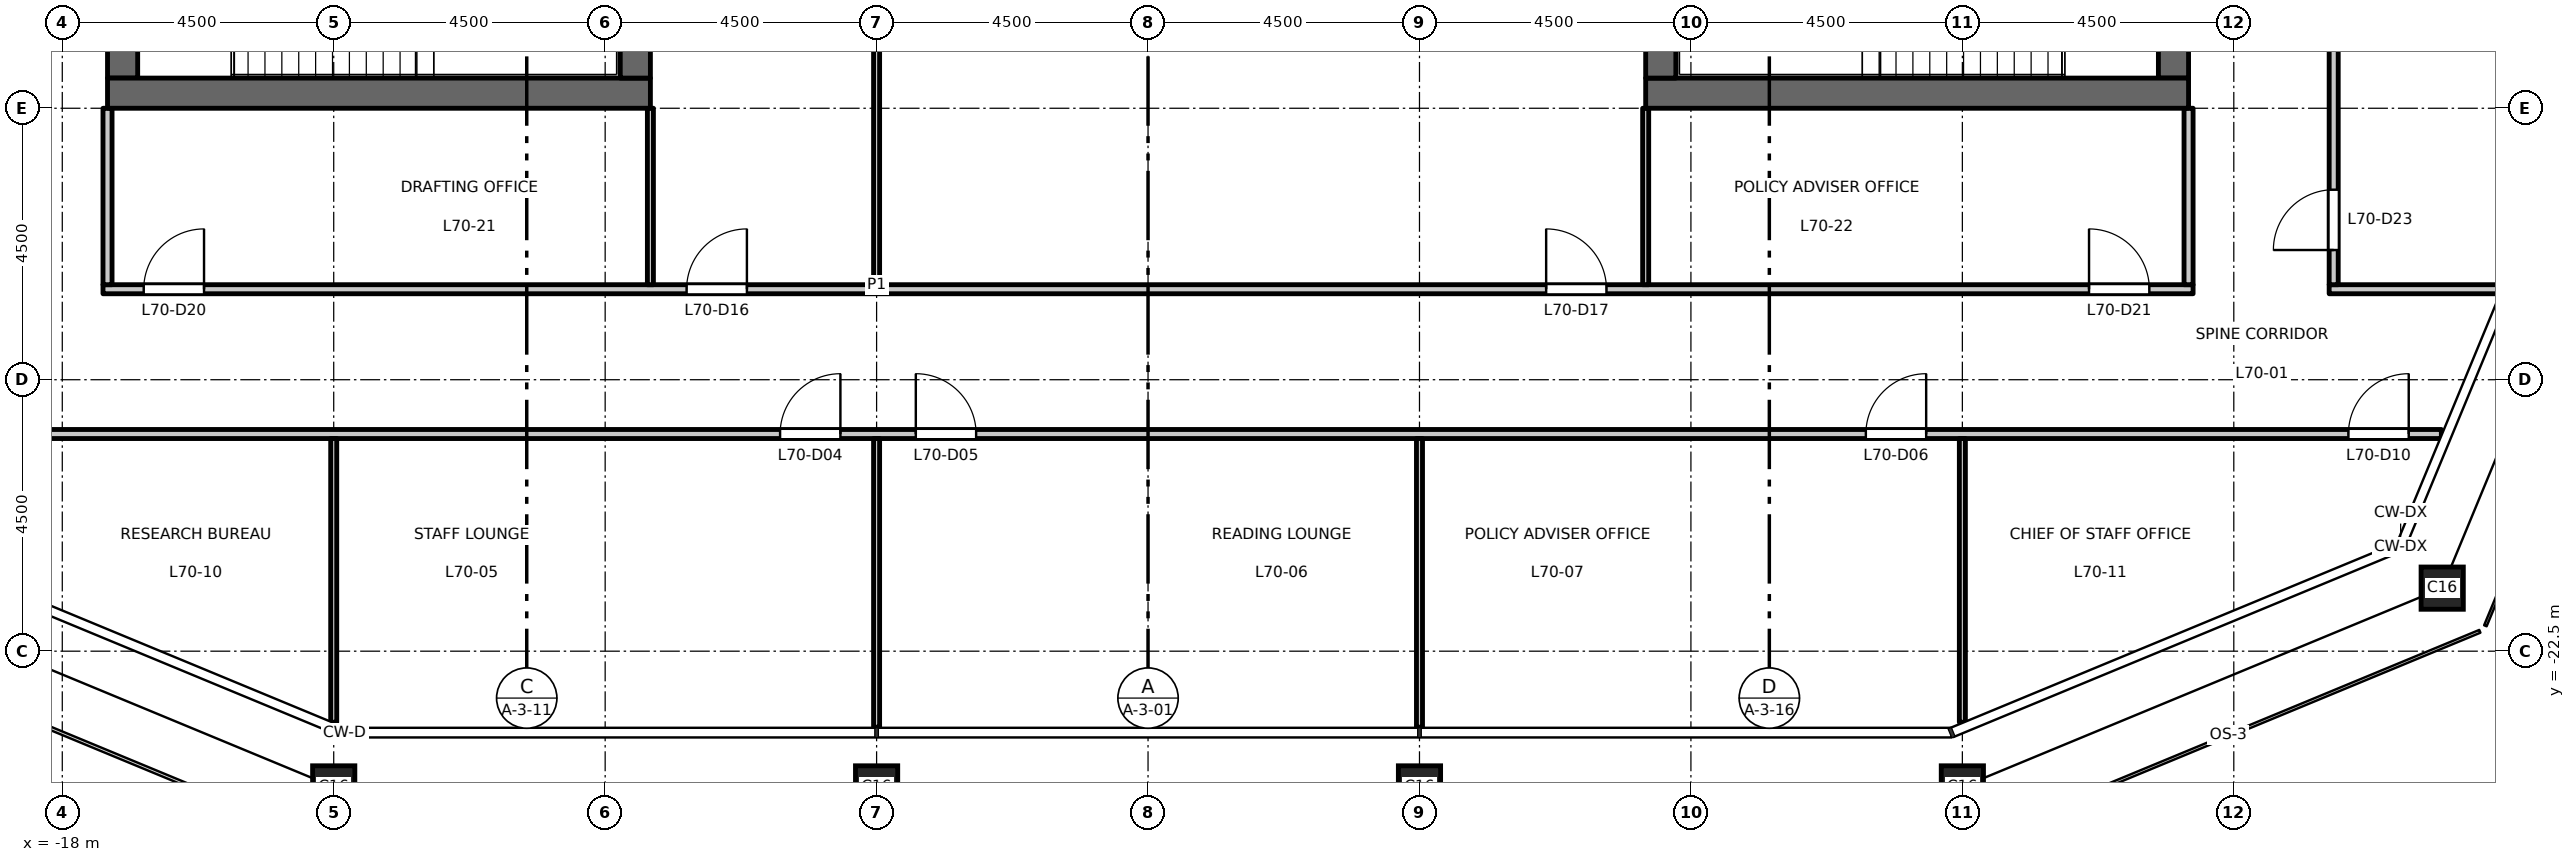
"""IFC4 building model, lengths in metres.
Left out: names, types, materials, properties, quantities, classifications, styles, units other than length and angle.
Written with IfcOpenShell. Run it as: python <this file> out.ifc"""

import sys

from ifc_helpers import new_model, si_unit, direction, frame, frame_2d, origin, origin_2d, place, context, subcontext, project, spatial, rectangle, hollow_rectangle, extrude, element, fill, save


model = new_model("IFC4")
c1 = context("Model", 3, precision=1e-05, world=origin(), true_north=direction((0.0, 1.0)))
c2 = subcontext(c1, "Body", "Model", "MODEL_VIEW")
j1 = project(units=[si_unit("LENGTHUNIT", "METRE"), si_unit("PLANEANGLEUNIT", "RADIAN")], contexts=[c1])
p1 = place(None, origin())
s1 = spatial("IfcSite", under=j1, at=p1, CompositionType="ELEMENT")
p2 = place(p1, origin())
s2 = spatial("IfcBuilding", under=s1, at=p2, CompositionType="ELEMENT")
p3 = place(p2, frame((0.0, 0.0, 325.7)))
s3 = spatial("IfcBuildingStorey", under=s2, at=p3, CompositionType="ELEMENT", Elevation=325.7)
for number, where, z_axis, x_axis in (
    (1, (-13.5, -24.75, 0.0), (0.0, 0.0, 1.0), (1.0, 0.0, 0.0)),
    (2, (-4.5, -24.75, 0.0), (0.0, 0.0, 1.0), (1.0, 0.0, 0.0)),
    (3, (4.5, -24.75, 0.0), (0.0, 0.0, 1.0), (1.0, 0.0, 0.0)),
    (4, (13.5, -24.75, 0.0), (0.0, 0.0, 1.0), (1.0, 0.0, 0.0)),
    (5, (21.455, -21.455, 0.0), (0.0, 0.0, 1.0), (1.0, 0.0, 0.0)),
):
    element("IfcColumn", number, at=place(p3, frame(where, z_axis=z_axis, x_axis=x_axis)), inside=s3, PredefinedType="COLUMN", context=c2, shape_type="SweptSolid", body=[
        extrude(hollow_rectangle(XDim=0.7, YDim=0.7, WallThickness=0.036, at=origin_2d()), origin(), (0.0, 0.0, 1.0), 4.5),
    ])
p4 = place(p3, frame((-17.0, -13.0, 0.0), z_axis=(0.0, 0.0, 1.0), x_axis=(0.0, 1.0, 0.0)))
e6 = element("IfcWall", 6, at=p4, inside=s3, PredefinedType="SHEAR", context=c2, shape_type="SweptSolid", body=[
    extrude(rectangle(XDim=26.0, YDim=0.5, at=frame_2d((13.0, 0.0))), origin(), (0.0, 0.0, 1.0), 4.35),
])
p5 = place(p4, frame((16.825, 0.0, 0.0)))
e7 = element("IfcOpeningElement", 7, at=p5, cuts=e6, PredefinedType="OPENING", context=c2, shape_type="SweptSolid", body=[
    extrude(rectangle(XDim=1.8, YDim=2.1, at=frame_2d((0.9, 1.05))), frame((0.0, 0.26, 0.0), z_axis=(0.0, -1.0, 0.0), x_axis=(1.0, 0.0, 0.0)), (0.0, 0.0, 1.0), 0.52),
])
p6 = place(p4, frame((7.375, 0.0, 0.0)))
e8 = element("IfcOpeningElement", 8, at=p6, cuts=e6, PredefinedType="OPENING", context=c2, shape_type="SweptSolid", body=[
    extrude(rectangle(XDim=1.8, YDim=2.1, at=frame_2d((0.9, 1.05))), frame((0.0, 0.26, 0.0), z_axis=(0.0, -1.0, 0.0), x_axis=(1.0, 0.0, 0.0)), (0.0, 0.0, 1.0), 0.52),
])
p7 = place(p3, frame((-8.25, -13.25, 0.0), z_axis=(0.0, 0.0, 1.0), x_axis=(-1.0, 0.0, 0.0)))
e9 = element("IfcWall", 9, at=p7, inside=s3, PredefinedType="SHEAR", context=c2, shape_type="SweptSolid", body=[
    extrude(rectangle(XDim=9.0, YDim=0.5, at=frame_2d((4.5, 0.0))), origin(), (0.0, 0.0, 1.0), 4.35),
])
p8 = place(p3, frame((-8.5, -13.0, 0.0), z_axis=(0.0, 0.0, 1.0), x_axis=(0.0, 1.0, 0.0)))
e10 = element("IfcWall", 10, at=p8, inside=s3, PredefinedType="SHEAR", context=c2, shape_type="SweptSolid", body=[
    extrude(rectangle(XDim=26.0, YDim=0.5, at=frame_2d((13.0, 0.0))), origin(), (0.0, 0.0, 1.0), 4.35),
])
p9 = place(p3, frame((17.0, -13.0, 0.0), z_axis=(0.0, 0.0, 1.0), x_axis=(0.0, 1.0, 0.0)))
e11 = element("IfcWall", 11, at=p9, inside=s3, PredefinedType="SHEAR", context=c2, shape_type="SweptSolid", body=[
    extrude(rectangle(XDim=26.0, YDim=0.5, at=frame_2d((13.0, 0.0))), origin(), (0.0, 0.0, 1.0), 4.35),
])
p10 = place(p9, frame((16.825, 0.0, 0.0)))
e12 = element("IfcOpeningElement", 12, at=p10, cuts=e11, PredefinedType="OPENING", context=c2, shape_type="SweptSolid", body=[
    extrude(rectangle(XDim=1.8, YDim=2.1, at=frame_2d((0.9, 1.05))), frame((0.0, 0.26, 0.0), z_axis=(0.0, -1.0, 0.0), x_axis=(1.0, 0.0, 0.0)), (0.0, 0.0, 1.0), 0.52),
])
p11 = place(p9, frame((7.375, 0.0, 0.0)))
e13 = element("IfcOpeningElement", 13, at=p11, cuts=e11, PredefinedType="OPENING", context=c2, shape_type="SweptSolid", body=[
    extrude(rectangle(XDim=1.8, YDim=2.1, at=frame_2d((0.9, 1.05))), frame((0.0, 0.26, 0.0), z_axis=(0.0, -1.0, 0.0), x_axis=(1.0, 0.0, 0.0)), (0.0, 0.0, 1.0), 0.52),
])
p12 = place(p3, frame((8.25, -13.25, 0.0), z_axis=(0.0, 0.0, 1.0), x_axis=(1.0, 0.0, 0.0)))
e14 = element("IfcWall", 14, at=p12, inside=s3, PredefinedType="SHEAR", context=c2, shape_type="SweptSolid", body=[
    extrude(rectangle(XDim=9.0, YDim=0.5, at=frame_2d((4.5, 0.0))), origin(), (0.0, 0.0, 1.0), 4.35),
])
p13 = place(p3, frame((8.5, -13.0, 0.0), z_axis=(0.0, 0.0, 1.0), x_axis=(0.0, 1.0, 0.0)))
e15 = element("IfcWall", 15, at=p13, inside=s3, PredefinedType="SHEAR", context=c2, shape_type="SweptSolid", body=[
    extrude(rectangle(XDim=26.0, YDim=0.5, at=frame_2d((13.0, 0.0))), origin(), (0.0, 0.0, 1.0), 4.35),
])
p14 = place(p3, frame((-21.441, -18.9, 0.0), z_axis=(0.0, 0.0, 1.0), x_axis=(1.0, 0.0, 0.0)))
e16 = element("IfcWall", 16, at=p14, inside=s3, PredefinedType="PARTITIONING", context=c2, shape_type="SweptSolid", body=[
    extrude(rectangle(XDim=42.882, YDim=0.15, at=frame_2d((21.441, 0.0))), origin(), (0.0, 0.0, 1.0), 4.35),
])
p15 = place(p14, frame((15.341, 0.0, 0.0)))
e17 = element("IfcOpeningElement", 17, at=p15, cuts=e16, PredefinedType="OPENING", context=c2, shape_type="SweptSolid", body=[
    extrude(rectangle(XDim=1.0, YDim=2.1, at=frame_2d((0.5, 1.05))), frame((0.0, 0.085, 0.0), z_axis=(0.0, -1.0, 0.0), x_axis=(1.0, 0.0, 0.0)), (0.0, 0.0, 1.0), 0.17),
])
p16 = place(p14, frame((17.591, 0.0, 0.0)))
e18 = element("IfcOpeningElement", 18, at=p16, cuts=e16, PredefinedType="OPENING", context=c2, shape_type="SweptSolid", body=[
    extrude(rectangle(XDim=1.0, YDim=2.1, at=frame_2d((0.5, 1.05))), frame((0.0, 0.085, 0.0), z_axis=(0.0, -1.0, 0.0), x_axis=(1.0, 0.0, 0.0)), (0.0, 0.0, 1.0), 0.17),
])
p17 = place(p14, frame((33.341, 0.0, 0.0)))
e19 = element("IfcOpeningElement", 19, at=p17, cuts=e16, PredefinedType="OPENING", context=c2, shape_type="SweptSolid", body=[
    extrude(rectangle(XDim=1.0, YDim=2.1, at=frame_2d((0.5, 1.05))), frame((0.0, 0.085, 0.0), z_axis=(0.0, -1.0, 0.0), x_axis=(1.0, 0.0, 0.0)), (0.0, 0.0, 1.0), 0.17),
])
p18 = place(p14, frame((0.65, 0.0, 0.0)))
e20 = element("IfcOpeningElement", 20, at=p18, cuts=e16, PredefinedType="OPENING", context=c2, shape_type="SweptSolid", body=[
    extrude(rectangle(XDim=1.0, YDim=2.1, at=frame_2d((0.5, 1.05))), frame((0.0, 0.085, 0.0), z_axis=(0.0, -1.0, 0.0), x_axis=(1.0, 0.0, 0.0)), (0.0, 0.0, 1.0), 0.17),
])
p19 = place(p14, frame((41.341, 0.0, 0.0)))
e21 = element("IfcOpeningElement", 21, at=p19, cuts=e16, PredefinedType="OPENING", context=c2, shape_type="SweptSolid", body=[
    extrude(rectangle(XDim=1.0, YDim=2.1, at=frame_2d((0.5, 1.05))), frame((0.0, 0.085, 0.0), z_axis=(0.0, -1.0, 0.0), x_axis=(1.0, 0.0, 0.0)), (0.0, 0.0, 1.0), 0.17),
])
p20 = place(p3, frame((-17.325, -16.5, 0.0), z_axis=(0.0, 0.0, 1.0), x_axis=(1.0, 0.0, 0.0)))
e22 = element("IfcWall", 22, at=p20, inside=s3, PredefinedType="PARTITIONING", context=c2, shape_type="SweptSolid", body=[
    extrude(rectangle(XDim=34.65, YDim=0.15, at=frame_2d((17.325, 0.0))), origin(), (0.0, 0.0, 1.0), 4.35),
])
p21 = place(p20, frame((9.675, 0.0, 0.0)))
e23 = element("IfcOpeningElement", 23, at=p21, cuts=e22, PredefinedType="OPENING", context=c2, shape_type="SweptSolid", body=[
    extrude(rectangle(XDim=1.0, YDim=2.1, at=frame_2d((0.5, 1.05))), frame((0.0, 0.085, 0.0), z_axis=(0.0, -1.0, 0.0), x_axis=(1.0, 0.0, 0.0)), (0.0, 0.0, 1.0), 0.17),
])
p22 = place(p20, frame((23.925, 0.0, 0.0)))
e24 = element("IfcOpeningElement", 24, at=p22, cuts=e22, PredefinedType="OPENING", context=c2, shape_type="SweptSolid", body=[
    extrude(rectangle(XDim=1.0, YDim=2.1, at=frame_2d((0.5, 1.05))), frame((0.0, 0.085, 0.0), z_axis=(0.0, -1.0, 0.0), x_axis=(1.0, 0.0, 0.0)), (0.0, 0.0, 1.0), 0.17),
])
p23 = place(p20, frame((0.675, 0.0, 0.0)))
e25 = element("IfcOpeningElement", 25, at=p23, cuts=e22, PredefinedType="OPENING", context=c2, shape_type="SweptSolid", body=[
    extrude(rectangle(XDim=1.0, YDim=2.1, at=frame_2d((0.5, 1.05))), frame((0.0, 0.085, 0.0), z_axis=(0.0, -1.0, 0.0), x_axis=(1.0, 0.0, 0.0)), (0.0, 0.0, 1.0), 0.17),
])
p24 = place(p20, frame((32.925, 0.0, 0.0)))
e26 = element("IfcOpeningElement", 26, at=p24, cuts=e22, PredefinedType="OPENING", context=c2, shape_type="SweptSolid", body=[
    extrude(rectangle(XDim=1.0, YDim=2.1, at=frame_2d((0.5, 1.05))), frame((0.0, 0.085, 0.0), z_axis=(0.0, -1.0, 0.0), x_axis=(1.0, 0.0, 0.0)), (0.0, 0.0, 1.0), 0.17),
])
p25 = place(p3, frame((19.581, -16.5, 0.0), z_axis=(0.0, 0.0, 1.0), x_axis=(1.0, 0.0, 0.0)))
e27 = element("IfcWall", 27, at=p25, inside=s3, PredefinedType="PARTITIONING", context=c2, shape_type="SweptSolid", body=[
    extrude(rectangle(XDim=2.855, YDim=0.15, at=frame_2d((1.427, 0.0))), origin(), (0.0, 0.0, 1.0), 4.35),
])
p26 = place(p3, frame((-17.25, -16.425, 0.0), z_axis=(0.0, 0.0, 1.0), x_axis=(0.0, 1.0, 0.0)))
e28 = element("IfcWall", 28, at=p26, inside=s3, PredefinedType="PARTITIONING", context=c2, shape_type="SweptSolid", body=[
    extrude(rectangle(XDim=2.925, YDim=0.15, at=frame_2d((1.462, 0.0))), origin(), (0.0, 0.0, 1.0), 4.35),
])
p27 = place(p3, frame((-13.5, -23.678, 0.0), z_axis=(0.0, 0.0, 1.0), x_axis=(0.0, 1.0, 0.0)))
e29 = element("IfcWall", 29, at=p27, inside=s3, PredefinedType="PARTITIONING", context=c2, shape_type="SweptSolid", body=[
    extrude(rectangle(XDim=4.703, YDim=0.1, at=frame_2d((2.352, 0.0))), origin(), (0.0, 0.0, 1.0), 3.75),
])
p28 = place(p3, frame((-8.25, -16.425, 0.0), z_axis=(0.0, 0.0, 1.0), x_axis=(0.0, 1.0, 0.0)))
e30 = element("IfcWall", 30, at=p28, inside=s3, PredefinedType="PARTITIONING", context=c2, shape_type="SweptSolid", body=[
    extrude(rectangle(XDim=2.925, YDim=0.1, at=frame_2d((1.462, 0.0))), origin(), (0.0, 0.0, 1.0), 4.35),
])
p29 = place(p3, frame((-4.5, -23.76, 0.0), z_axis=(0.0, 0.0, 1.0), x_axis=(0.0, 1.0, 0.0)))
e31 = element("IfcWall", 31, at=p29, inside=s3, PredefinedType="PARTITIONING", context=c2, shape_type="SweptSolid", body=[
    extrude(rectangle(XDim=4.785, YDim=0.1, at=frame_2d((2.393, 0.0))), origin(), (0.0, 0.0, 1.0), 3.65),
])
p30 = place(p3, frame((-4.5, -16.425, 0.0), z_axis=(0.0, 0.0, 1.0), x_axis=(0.0, 1.0, 0.0)))
e32 = element("IfcWall", 32, at=p30, inside=s3, PredefinedType="PARTITIONING", context=c2, shape_type="SweptSolid", body=[
    extrude(rectangle(XDim=8.055, YDim=0.1, at=frame_2d((4.027, 0.0))), origin(), (0.0, 0.0, 1.0), 3.65),
])
p31 = place(p3, frame((4.5, -23.76, 0.0), z_axis=(0.0, 0.0, 1.0), x_axis=(0.0, 1.0, 0.0)))
e33 = element("IfcWall", 33, at=p31, inside=s3, PredefinedType="PARTITIONING", context=c2, shape_type="SweptSolid", body=[
    extrude(rectangle(XDim=4.785, YDim=0.1, at=frame_2d((2.393, 0.0))), origin(), (0.0, 0.0, 1.0), 3.65),
])
p32 = place(p3, frame((8.25, -16.425, 0.0), z_axis=(0.0, 0.0, 1.0), x_axis=(0.0, 1.0, 0.0)))
e34 = element("IfcWall", 34, at=p32, inside=s3, PredefinedType="PARTITIONING", context=c2, shape_type="SweptSolid", body=[
    extrude(rectangle(XDim=2.925, YDim=0.1, at=frame_2d((1.462, 0.0))), origin(), (0.0, 0.0, 1.0), 4.35),
])
p33 = place(p3, frame((13.5, -23.678, 0.0), z_axis=(0.0, 0.0, 1.0), x_axis=(0.0, 1.0, 0.0)))
e35 = element("IfcWall", 35, at=p33, inside=s3, PredefinedType="PARTITIONING", context=c2, shape_type="SweptSolid", body=[
    extrude(rectangle(XDim=4.703, YDim=0.1, at=frame_2d((2.352, 0.0))), origin(), (0.0, 0.0, 1.0), 3.75),
])
p34 = place(p3, frame((17.25, -16.425, 0.0), z_axis=(0.0, 0.0, 1.0), x_axis=(0.0, 1.0, 0.0)))
e36 = element("IfcWall", 36, at=p34, inside=s3, PredefinedType="PARTITIONING", context=c2, shape_type="SweptSolid", body=[
    extrude(rectangle(XDim=2.925, YDim=0.15, at=frame_2d((1.462, 0.0))), origin(), (0.0, 0.0, 1.0), 4.35),
])
p35 = place(p3, frame((19.656, -16.425, 0.0), z_axis=(0.0, 0.0, 1.0), x_axis=(0.0, 1.0, 0.0)))
e37 = element("IfcWall", 37, at=p35, inside=s3, PredefinedType="PARTITIONING", context=c2, shape_type="SweptSolid", body=[
    extrude(rectangle(XDim=32.845, YDim=0.15, at=frame_2d((16.422, 0.0))), origin(), (0.0, 0.0, 1.0), 4.35),
])
p36 = place(p35, frame((0.575, 0.0, 0.0)))
e38 = element("IfcOpeningElement", 38, at=p36, cuts=e37, PredefinedType="OPENING", context=c2, shape_type="SweptSolid", body=[
    extrude(rectangle(XDim=1.0, YDim=2.1, at=frame_2d((0.5, 1.05))), frame((0.0, 0.085, 0.0), z_axis=(0.0, -1.0, 0.0), x_axis=(1.0, 0.0, 0.0)), (0.0, 0.0, 1.0), 0.17),
])
p37 = place(p15, origin())
e39 = element("IfcDoor", 39, at=p37, inside=s3, OperationType="SINGLE_SWING_RIGHT", PredefinedType="DOOR", context=c2, shape_type="SweptSolid", body=[
    extrude(rectangle(XDim=1.0, YDim=2.1, at=frame_2d((0.5, 1.05))), frame((0.0, 0.025, 0.0), z_axis=(0.0, -1.0, 0.0), x_axis=(1.0, 0.0, 0.0)), (0.0, 0.0, 1.0), 0.05),
])
fill(e17, e39)
p38 = place(p16, origin())
e40 = element("IfcDoor", 40, at=p38, inside=s3, OperationType="SINGLE_SWING_LEFT", PredefinedType="DOOR", context=c2, shape_type="SweptSolid", body=[
    extrude(rectangle(XDim=1.0, YDim=2.1, at=frame_2d((0.5, 1.05))), frame((0.0, 0.025, 0.0), z_axis=(0.0, -1.0, 0.0), x_axis=(1.0, 0.0, 0.0)), (0.0, 0.0, 1.0), 0.05),
])
fill(e18, e40)
p39 = place(p17, origin())
e41 = element("IfcDoor", 41, at=p39, inside=s3, OperationType="SINGLE_SWING_RIGHT", PredefinedType="DOOR", context=c2, shape_type="SweptSolid", body=[
    extrude(rectangle(XDim=1.0, YDim=2.1, at=frame_2d((0.5, 1.05))), frame((0.0, 0.025, 0.0), z_axis=(0.0, -1.0, 0.0), x_axis=(1.0, 0.0, 0.0)), (0.0, 0.0, 1.0), 0.05),
])
fill(e19, e41)
p40 = place(p19, origin())
e42 = element("IfcDoor", 42, at=p40, inside=s3, OperationType="SINGLE_SWING_RIGHT", PredefinedType="DOOR", context=c2, shape_type="SweptSolid", body=[
    extrude(rectangle(XDim=1.0, YDim=2.1, at=frame_2d((0.5, 1.05))), frame((0.0, 0.025, 0.0), z_axis=(0.0, -1.0, 0.0), x_axis=(1.0, 0.0, 0.0)), (0.0, 0.0, 1.0), 0.05),
])
fill(e21, e42)
p41 = place(p21, origin())
e43 = element("IfcDoor", 43, at=p41, inside=s3, OperationType="SINGLE_SWING_RIGHT", PredefinedType="DOOR", context=c2, shape_type="SweptSolid", body=[
    extrude(rectangle(XDim=1.0, YDim=2.1, at=frame_2d((0.5, 1.05))), frame((0.0, 0.025, 0.0), z_axis=(0.0, -1.0, 0.0), x_axis=(1.0, 0.0, 0.0)), (0.0, 0.0, 1.0), 0.05),
])
fill(e23, e43)
p42 = place(p22, origin())
e44 = element("IfcDoor", 44, at=p42, inside=s3, OperationType="SINGLE_SWING_LEFT", PredefinedType="DOOR", context=c2, shape_type="SweptSolid", body=[
    extrude(rectangle(XDim=1.0, YDim=2.1, at=frame_2d((0.5, 1.05))), frame((0.0, 0.025, 0.0), z_axis=(0.0, -1.0, 0.0), x_axis=(1.0, 0.0, 0.0)), (0.0, 0.0, 1.0), 0.05),
])
fill(e24, e44)
p43 = place(p23, origin())
e45 = element("IfcDoor", 45, at=p43, inside=s3, OperationType="SINGLE_SWING_RIGHT", PredefinedType="DOOR", context=c2, shape_type="SweptSolid", body=[
    extrude(rectangle(XDim=1.0, YDim=2.1, at=frame_2d((0.5, 1.05))), frame((0.0, 0.025, 0.0), z_axis=(0.0, -1.0, 0.0), x_axis=(1.0, 0.0, 0.0)), (0.0, 0.0, 1.0), 0.05),
])
fill(e25, e45)
p44 = place(p24, origin())
e46 = element("IfcDoor", 46, at=p44, inside=s3, OperationType="SINGLE_SWING_LEFT", PredefinedType="DOOR", context=c2, shape_type="SweptSolid", body=[
    extrude(rectangle(XDim=1.0, YDim=2.1, at=frame_2d((0.5, 1.05))), frame((0.0, 0.025, 0.0), z_axis=(0.0, -1.0, 0.0), x_axis=(1.0, 0.0, 0.0)), (0.0, 0.0, 1.0), 0.05),
])
fill(e26, e46)
p45 = place(p36, origin())
e47 = element("IfcDoor", 47, at=p45, inside=s3, OperationType="SINGLE_SWING_LEFT", PredefinedType="DOOR", context=c2, shape_type="SweptSolid", body=[
    extrude(rectangle(XDim=1.0, YDim=2.1, at=frame_2d((0.5, 1.05))), frame((0.0, 0.025, 0.0), z_axis=(0.0, -1.0, 0.0), x_axis=(1.0, 0.0, 0.0)), (0.0, 0.0, 1.0), 0.05),
])
fill(e38, e47)
save(model, sys.argv[1])
